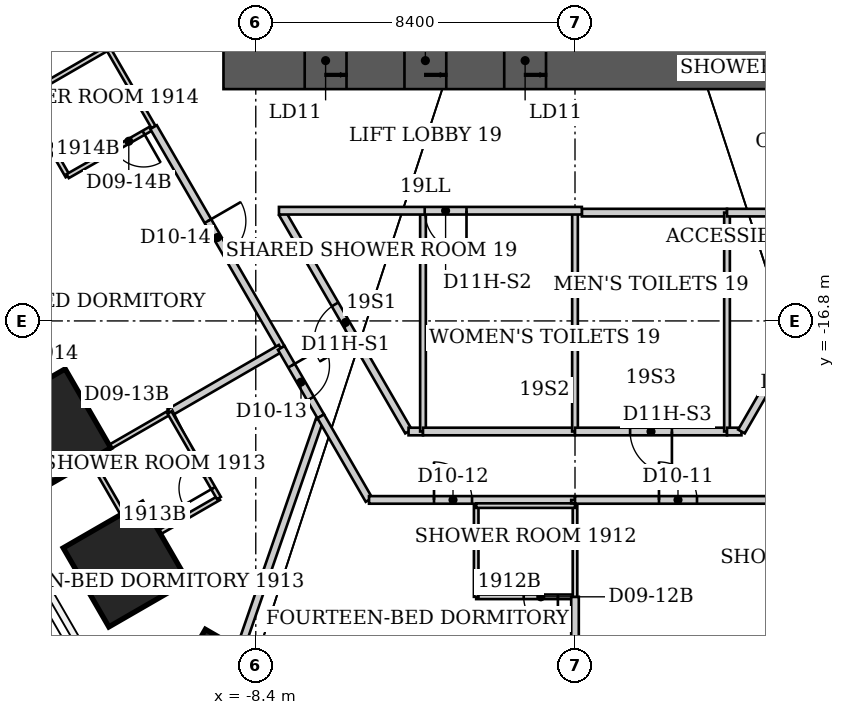
"""IFC4 building model, lengths in metres.
Left out: names, types, materials, properties, quantities, classifications, styles, units other than length and angle.
Written with IfcOpenShell. Run it as: python <this file> out.ifc"""

import sys

from ifc_helpers import new_model, si_unit, direction, frame, frame_2d, origin, origin_2d, place, context, subcontext, project, spatial, rectangle, extrude, element, fill, save


model = new_model("IFC4")
c1 = context("Model", 3, precision=1e-05, world=origin(), true_north=direction((0.0, 1.0)))
c2 = subcontext(c1, "Body", "Model", "MODEL_VIEW")
j1 = project(units=[si_unit("LENGTHUNIT", "METRE"), si_unit("PLANEANGLEUNIT", "RADIAN")], contexts=[c1])
p1 = place(None, origin())
s1 = spatial("IfcSite", under=j1, at=p1, CompositionType="ELEMENT")
p2 = place(p1, origin())
s2 = spatial("IfcBuilding", under=s1, at=p2, CompositionType="ELEMENT")
p3 = place(p2, frame((0.0, 0.0, 80.0)))
s3 = spatial("IfcBuildingStorey", under=s2, at=p3, CompositionType="ELEMENT", Elevation=80.0)
p4 = place(p3, frame((-8.766, -26.856, 0.0), z_axis=(0.014823987579, 0.04549873244, 0.998854401171), x_axis=(-0.499371140737, -0.865122253304, 0.046818272477)))
e1 = element("IfcColumn", 1, at=p4, inside=s3, PredefinedType="COLUMN", context=c2, shape_type="SweptSolid", body=[
    extrude(rectangle(XDim=2.4, YDim=3.6, at=origin_2d()), origin(), (0.0, 0.0, 1.0), 3.804),
])
p5 = place(p3, frame((-11.827, -23.212, 0.0), z_axis=(0.019833251954, 0.038960465812, 0.999043905052), x_axis=(-0.865703965576, -0.49921248457, 0.036654320816)))
e2 = element("IfcColumn", 2, at=p5, inside=s3, PredefinedType="COLUMN", context=c2, shape_type="SweptSolid", body=[
    extrude(rectangle(XDim=2.4, YDim=2.4, at=origin_2d()), origin(), (0.0, 0.0, 1.0), 3.804),
])
p6 = place(p3, frame((-13.854, -19.702, 0.0), z_axis=(0.02330242081, 0.033124102308, 0.999179558954), x_axis=(-0.865853874056, -0.498946587993, 0.036733787066)))
e3 = element("IfcColumn", 3, at=p6, inside=s3, PredefinedType="COLUMN", context=c2, shape_type="SweptSolid", body=[
    extrude(rectangle(XDim=2.4, YDim=2.4, at=origin_2d()), origin(), (0.0, 0.0, 1.0), 3.803),
])
p7 = place(p3, frame((-9.25, -9.95, 0.0), z_axis=(0.0, 0.0, 1.0), x_axis=(1.0, 0.0, 0.0)))
e4 = element("IfcWall", 4, at=p7, inside=s3, PredefinedType="SHEAR", context=c2, shape_type="SweptSolid", body=[
    extrude(rectangle(XDim=18.5, YDim=1.5, at=frame_2d((9.25, 0.0))), origin(), (0.0, 0.0, 1.0), 3.8),
])
p8 = place(p7, frame((2.137, 0.0, 0.0)))
e5 = element("IfcOpeningElement", 5, at=p8, cuts=e4, PredefinedType="OPENING", context=c2, shape_type="SweptSolid", body=[
    extrude(rectangle(XDim=1.1, YDim=2.1, at=frame_2d((0.55, 1.05))), frame((0.0, 0.75, 0.0), z_axis=(0.0, -1.0, 0.0), x_axis=(1.0, 0.0, 0.0)), (0.0, 0.0, 1.0), 1.5),
])
p9 = place(p7, frame((4.762, 0.0, 0.0)))
e6 = element("IfcOpeningElement", 6, at=p9, cuts=e4, PredefinedType="OPENING", context=c2, shape_type="SweptSolid", body=[
    extrude(rectangle(XDim=1.1, YDim=2.1, at=frame_2d((0.55, 1.05))), frame((0.0, 0.75, 0.0), z_axis=(0.0, -1.0, 0.0), x_axis=(1.0, 0.0, 0.0)), (0.0, 0.0, 1.0), 1.5),
])
p10 = place(p7, frame((7.387, 0.0, 0.0)))
e7 = element("IfcOpeningElement", 7, at=p10, cuts=e4, PredefinedType="OPENING", context=c2, shape_type="SweptSolid", body=[
    extrude(rectangle(XDim=1.1, YDim=2.1, at=frame_2d((0.55, 1.05))), frame((0.0, 0.75, 0.0), z_axis=(0.0, -1.0, 0.0), x_axis=(1.0, 0.0, 0.0)), (0.0, 0.0, 1.0), 1.5),
])
p11 = place(p3, frame((-15.064, -21.745, 0.0), z_axis=(0.0, 0.0, 1.0), x_axis=(0.866149070221, 0.499785742249, 0.0)))
e8 = element("IfcWall", 8, at=p11, inside=s3, PredefinedType="PARTITIONING", context=c2, shape_type="SweptSolid", body=[
    extrude(rectangle(XDim=2.672, YDim=0.2, at=frame_2d((1.336, 0.0))), origin(), (0.0, 0.0, 1.0), 3.64),
])
p12 = place(p3, frame((-14.54, -10.92, 0.0), z_axis=(0.0, 0.0, 1.0), x_axis=(0.49836161924, -0.866969259241, 0.0)))
e9 = element("IfcWall", 9, at=p12, inside=s3, PredefinedType="PARTITIONING", context=c2, shape_type="SweptSolid", body=[
    extrude(rectangle(XDim=2.388, YDim=0.12, at=frame_2d((1.194, 0.0))), origin(), (0.0, 0.0, 1.0), 3.64),
])
p13 = place(p3, frame((-14.54, -10.92, 0.0), z_axis=(0.0, 0.0, 1.0), x_axis=(0.865897630733, 0.500221244143, 0.0)))
e10 = element("IfcWall", 10, at=p13, inside=s3, PredefinedType="PARTITIONING", context=c2, shape_type="SweptSolid", body=[
    extrude(rectangle(XDim=2.598, YDim=0.12, at=frame_2d((1.299, 0.0))), origin(), (0.0, 0.0, 1.0), 3.64),
])
p14 = place(p3, frame((-13.35, -12.99, 0.0), z_axis=(0.0, 0.0, 1.0), x_axis=(0.868473984885, 0.49573474518, 0.0)))
e11 = element("IfcWall", 11, at=p14, inside=s3, PredefinedType="PARTITIONING", context=c2, shape_type="SweptSolid", body=[
    extrude(rectangle(XDim=2.602, YDim=0.12, at=frame_2d((1.301, 0.0))), origin(), (0.0, 0.0, 1.0), 3.64),
])
p15 = place(p14, frame((1.402, 0.0, 0.0)))
e12 = element("IfcOpeningElement", 12, at=p15, cuts=e11, PredefinedType="OPENING", context=c2, shape_type="SweptSolid", body=[
    extrude(rectangle(XDim=0.9, YDim=2.03, at=frame_2d((0.45, 1.015))), frame((0.0, 0.06, 0.0), z_axis=(0.0, -1.0, 0.0), x_axis=(1.0, 0.0, 0.0)), (0.0, 0.0, 1.0), 0.12),
])
p16 = place(p3, frame((-12.75, -20.41, 0.0), z_axis=(0.0, 0.0, 1.0), x_axis=(0.50025099007, -0.865880446098, 0.0)))
e13 = element("IfcWall", 13, at=p16, inside=s3, PredefinedType="PARTITIONING", context=c2, shape_type="SweptSolid", body=[
    extrude(rectangle(XDim=2.599, YDim=0.12, at=frame_2d((1.299, 0.0))), origin(), (0.0, 0.0, 1.0), 1.64),
])
p17 = place(p3, frame((-12.75, -20.41, 0.0), z_axis=(0.0, 0.0, 1.0), x_axis=(0.866202511239, 0.499693115345, 0.0)))
e14 = element("IfcWall", 14, at=p17, inside=s3, PredefinedType="PARTITIONING", context=c2, shape_type="SweptSolid", body=[
    extrude(rectangle(XDim=2.401, YDim=0.12, at=frame_2d((1.201, 0.0))), origin(), (0.0, 0.0, 1.0), 3.64),
])
for number, where, z_axis, x_axis in (
    (15, (-12.29, -9.62, 0.0), (0.0, 0.0, 1.0), (0.5, -0.866, 0.0)),
    (16, (-11.45, -22.66, 0.0), (0.0, 0.0, 1.0), (0.866, 0.5, 0.0)),
):
    element("IfcWall", number, at=place(p3, frame(where, z_axis=z_axis, x_axis=x_axis)), inside=s3, PredefinedType="PARTITIONING", context=c2, shape_type="SweptSolid", body=[
        extrude(rectangle(XDim=2.401, YDim=0.12, at=frame_2d((1.201, 0.0))), origin(), (0.0, 0.0, 1.0), 3.64),
    ])
p18 = place(p3, frame((-11.09, -11.7, 0.0), z_axis=(0.0, 0.0, 1.0), x_axis=(0.500633295611, -0.865659461524, 0.0)))
e17 = element("IfcWall", 17, at=p18, inside=s3, PredefinedType="PARTITIONING", context=c2, shape_type="SweptSolid", body=[
    extrude(rectangle(XDim=6.712, YDim=0.2, at=frame_2d((3.356, 0.0))), origin(), (0.0, 0.0, 1.0), 3.64),
])
p19 = place(p18, frame((2.856, 0.0, 0.0)))
e18 = element("IfcOpeningElement", 18, at=p19, cuts=e17, PredefinedType="OPENING", context=c2, shape_type="SweptSolid", body=[
    extrude(rectangle(XDim=1.0, YDim=2.13, at=frame_2d((0.5, 1.065))), frame((0.0, 0.1, 0.0), z_axis=(0.0, -1.0, 0.0), x_axis=(1.0, 0.0, 0.0)), (0.0, 0.0, 1.0), 0.2),
])
p20 = place(p3, frame((-10.67, -19.21, 0.0), z_axis=(0.0, 0.0, 1.0), x_axis=(0.865707941605, 0.500549457937, 0.0)))
e19 = element("IfcWall", 19, at=p20, inside=s3, PredefinedType="PARTITIONING", context=c2, shape_type="SweptSolid", body=[
    extrude(rectangle(XDim=3.381, YDim=0.2, at=frame_2d((1.69, 0.0))), origin(), (0.0, 0.0, 1.0), 3.64),
])
p21 = place(p3, frame((-10.2, -29.442, 0.0), z_axis=(0.0, 0.0, 1.0), x_axis=(0.327375786306, 0.944894223996, 0.0)))
e20 = element("IfcWall", 20, at=p21, inside=s3, PredefinedType="PARTITIONING", context=c2, shape_type="SweptSolid", body=[
    extrude(rectangle(XDim=10.623, YDim=0.2, at=frame_2d((5.311, 0.0))), origin(), (0.0, 0.0, 1.0), 3.64),
])
p22 = place(p3, frame((-9.37, -21.46, 0.0), z_axis=(0.0, 0.0, 1.0), x_axis=(-0.500221244143, 0.865897630733, 0.0)))
e21 = element("IfcWall", 21, at=p22, inside=s3, PredefinedType="PARTITIONING", context=c2, shape_type="SweptSolid", body=[
    extrude(rectangle(XDim=2.598, YDim=0.12, at=frame_2d((1.299, 0.0))), origin(), (0.0, 0.0, 1.0), 3.64),
])
p23 = place(p22, frame((0.3, 0.0, 0.0)))
e22 = element("IfcOpeningElement", 22, at=p23, cuts=e21, PredefinedType="OPENING", context=c2, shape_type="SweptSolid", body=[
    extrude(rectangle(XDim=0.9, YDim=2.03, at=frame_2d((0.45, 1.015))), frame((0.0, 0.06, 0.0), z_axis=(0.0, -1.0, 0.0), x_axis=(1.0, 0.0, 0.0)), (0.0, 0.0, 1.0), 0.12),
])
p24 = place(p3, frame((-7.73, -17.51, 0.0), z_axis=(0.0, 0.0, 1.0), x_axis=(0.500281510986, -0.865862812324, 0.0)))
e23 = element("IfcWall", 23, at=p24, inside=s3, PredefinedType="PARTITIONING", context=c2, shape_type="SweptSolid", body=[
    extrude(rectangle(XDim=2.079, YDim=0.2, at=frame_2d((1.04, 0.0))), origin(), (0.0, 0.0, 1.0), 3.64),
])
p25 = place(p24, frame((0.539, 0.0, 0.0)))
e24 = element("IfcOpeningElement", 24, at=p25, cuts=e23, PredefinedType="OPENING", context=c2, shape_type="SweptSolid", body=[
    extrude(rectangle(XDim=1.0, YDim=2.13, at=frame_2d((0.5, 1.065))), frame((0.0, 0.1, 0.0), z_axis=(0.0, -1.0, 0.0), x_axis=(1.0, 0.0, 0.0)), (0.0, 0.0, 1.0), 0.2),
])
p26 = place(p3, frame((-6.69, -19.31, 0.0), z_axis=(0.0, 0.0, 1.0), x_axis=(0.499963722229, -0.866046347752, 0.0)))
e25 = element("IfcWall", 25, at=p26, inside=s3, PredefinedType="PARTITIONING", context=c2, shape_type="SweptSolid", body=[
    extrude(rectangle(XDim=2.54, YDim=0.2, at=frame_2d((1.27, 0.0))), origin(), (0.0, 0.0, 1.0), 3.64),
])
p27 = place(p3, frame((-5.42, -21.51, 0.0), z_axis=(0.0, 0.0, 1.0), x_axis=(1.0, 0.0, 0.0)))
e26 = element("IfcWall", 26, at=p27, inside=s3, PredefinedType="PARTITIONING", context=c2, shape_type="SweptSolid", body=[
    extrude(rectangle(XDim=5.42, YDim=0.2, at=frame_2d((2.71, 0.0))), origin(), (0.0, 0.0, 1.0), 3.64),
])
p28 = place(p27, frame((1.71, 0.0, 0.0)))
e27 = element("IfcOpeningElement", 27, at=p28, cuts=e26, PredefinedType="OPENING", context=c2, shape_type="SweptSolid", body=[
    extrude(rectangle(XDim=1.0, YDim=2.13, at=frame_2d((0.5, 1.065))), frame((0.0, 0.1, 0.0), z_axis=(0.0, -1.0, 0.0), x_axis=(1.0, 0.0, 0.0)), (0.0, 0.0, 1.0), 0.2),
])
p29 = place(p3, frame((-4.38, -19.71, 0.0), z_axis=(0.0, 0.0, 1.0), x_axis=(-0.500523653757, 0.865722860984, 0.0)))
e28 = element("IfcWall", 28, at=p29, inside=s3, PredefinedType="PARTITIONING", context=c2, shape_type="SweptSolid", body=[
    extrude(rectangle(XDim=6.628, YDim=0.2, at=frame_2d((3.314, 0.0))), origin(), (0.0, 0.0, 1.0), 3.64),
])
p30 = place(p29, frame((2.764, 0.0, 0.0)))
e29 = element("IfcOpeningElement", 29, at=p30, cuts=e28, PredefinedType="OPENING", context=c2, shape_type="SweptSolid", body=[
    extrude(rectangle(XDim=1.1, YDim=2.2, at=frame_2d((0.55, 1.1))), frame((0.0, 0.1, 0.0), z_axis=(0.0, -1.0, 0.0), x_axis=(1.0, 0.0, 0.0)), (0.0, 0.0, 1.0), 0.2),
])
p31 = place(p3, frame((-4.0, -19.71, 0.0), z_axis=(0.0, 0.0, 1.0), x_axis=(-1.0, 0.0, 0.0)))
e30 = element("IfcWall", 30, at=p31, inside=s3, PredefinedType="PARTITIONING", context=c2, shape_type="SweptSolid", body=[
    extrude(rectangle(XDim=0.38, YDim=0.2, at=frame_2d((0.19, 0.0))), origin(), (0.0, 0.0, 1.0), 3.64),
])
p32 = place(p3, frame((-4.0, -14.0, 0.0), z_axis=(0.0, 0.0, 1.0), x_axis=(0.0, -1.0, 0.0)))
e31 = element("IfcWall", 31, at=p32, inside=s3, PredefinedType="PARTITIONING", context=c2, shape_type="SweptSolid", body=[
    extrude(rectangle(XDim=5.71, YDim=0.15, at=frame_2d((2.855, 0.0))), origin(), (0.0, 0.0, 1.0), 2.878),
])
p33 = place(p3, frame((-2.6, -24.06, 0.0), z_axis=(0.0, 0.0, 1.0), x_axis=(1.0, 0.0, 0.0)))
e32 = element("IfcWall", 32, at=p33, inside=s3, PredefinedType="PARTITIONING", context=c2, shape_type="SweptSolid", body=[
    extrude(rectangle(XDim=2.6, YDim=0.12, at=frame_2d((1.3, 0.0))), origin(), (0.0, 0.0, 1.0), 3.64),
])
p34 = place(p33, frame((1.25, 0.0, 0.0)))
e33 = element("IfcOpeningElement", 33, at=p34, cuts=e32, PredefinedType="OPENING", context=c2, shape_type="SweptSolid", body=[
    extrude(rectangle(XDim=0.9, YDim=2.03, at=frame_2d((0.45, 1.015))), frame((0.0, 0.06, 0.0), z_axis=(0.0, -1.0, 0.0), x_axis=(1.0, 0.0, 0.0)), (0.0, 0.0, 1.0), 0.12),
])
p35 = place(p3, frame((-2.6, -21.66, 0.0), z_axis=(0.0, 0.0, 1.0), x_axis=(0.0, -1.0, 0.0)))
e34 = element("IfcWall", 34, at=p35, inside=s3, PredefinedType="PARTITIONING", context=c2, shape_type="SweptSolid", body=[
    extrude(rectangle(XDim=2.4, YDim=0.12, at=frame_2d((1.2, 0.0))), origin(), (0.0, 0.0, 1.0), 3.64),
])
p36 = place(p3, frame((0.0, -29.89, 0.0), z_axis=(0.0, 0.0, 1.0), x_axis=(0.0, 1.0, 0.0)))
e35 = element("IfcWall", 35, at=p36, inside=s3, PredefinedType="PARTITIONING", context=c2, shape_type="SweptSolid", body=[
    extrude(rectangle(XDim=5.83, YDim=0.2, at=frame_2d((2.915, 0.0))), origin(), (0.0, 0.0, 1.0), 2.86),
])
p37 = place(p3, frame((0.0, -24.06, 0.0), z_axis=(0.0, 0.0, 1.0), x_axis=(0.0, 1.0, 0.0)))
e36 = element("IfcWall", 36, at=p37, inside=s3, PredefinedType="PARTITIONING", context=c2, shape_type="SweptSolid", body=[
    extrude(rectangle(XDim=2.4, YDim=0.12, at=frame_2d((1.2, 0.0))), origin(), (0.0, 0.0, 1.0), 2.86),
])
p38 = place(p3, frame((0.0, -21.66, 0.0), z_axis=(0.0, 0.0, 1.0), x_axis=(-1.0, 0.0, 0.0)))
e37 = element("IfcWall", 37, at=p38, inside=s3, PredefinedType="PARTITIONING", context=c2, shape_type="SweptSolid", body=[
    extrude(rectangle(XDim=2.6, YDim=0.12, at=frame_2d((1.3, 0.0))), origin(), (0.0, 0.0, 1.0), 3.64),
])
p39 = place(p3, frame((0.0, -21.6, 0.0), z_axis=(0.0, 0.0, 1.0), x_axis=(0.0, 1.0, 0.0)))
e38 = element("IfcWall", 38, at=p39, inside=s3, PredefinedType="PARTITIONING", context=c2, shape_type="SweptSolid", body=[
    extrude(rectangle(XDim=0.09, YDim=0.2, at=frame_2d((0.045, 0.0))), origin(), (0.0, 0.0, 1.0), 3.64),
])
p40 = place(p3, frame((0.0, -21.51, 0.0), z_axis=(0.0, 0.0, 1.0), x_axis=(1.0, 0.0, 0.0)))
e39 = element("IfcWall", 39, at=p40, inside=s3, PredefinedType="PARTITIONING", context=c2, shape_type="SweptSolid", body=[
    extrude(rectangle(XDim=5.42, YDim=0.2, at=frame_2d((2.71, 0.0))), origin(), (0.0, 0.0, 1.0), 3.64),
])
p41 = place(p40, frame((2.21, 0.0, 0.0)))
e40 = element("IfcOpeningElement", 40, at=p41, cuts=e39, PredefinedType="OPENING", context=c2, shape_type="SweptSolid", body=[
    extrude(rectangle(XDim=1.0, YDim=2.13, at=frame_2d((0.5, 1.065))), frame((0.0, 0.1, 0.0), z_axis=(0.0, -1.0, 0.0), x_axis=(1.0, 0.0, 0.0)), (0.0, 0.0, 1.0), 0.2),
])
p42 = place(p3, frame((0.0, -19.71, 0.0), z_axis=(0.0, 0.0, 1.0), x_axis=(-1.0, 0.0, 0.0)))
e41 = element("IfcWall", 41, at=p42, inside=s3, PredefinedType="PARTITIONING", context=c2, shape_type="SweptSolid", body=[
    extrude(rectangle(XDim=4.0, YDim=0.2, at=frame_2d((2.0, 0.0))), origin(), (0.0, 0.0, 1.0), 3.64),
])
p43 = place(p3, frame((0.0, -13.95, 0.0), z_axis=(0.0, 0.0, 1.0), x_axis=(0.0, -1.0, 0.0)))
e42 = element("IfcWall", 42, at=p43, inside=s3, PredefinedType="PARTITIONING", context=c2, shape_type="SweptSolid", body=[
    extrude(rectangle(XDim=5.76, YDim=0.15, at=frame_2d((2.88, 0.0))), origin(), (0.0, 0.0, 1.0), 2.86),
])
p44 = place(p3, frame((0.18, -13.95, 0.0), z_axis=(0.0, 0.0, 1.0), x_axis=(1.0, 0.0, 0.0)))
e43 = element("IfcWall", 43, at=p44, inside=s3, PredefinedType="PARTITIONING", context=c2, shape_type="SweptSolid", body=[
    extrude(rectangle(XDim=3.82, YDim=0.2, at=frame_2d((1.91, 0.0))), origin(), (0.0, 0.0, 1.0), 3.64),
])
p45 = place(p3, frame((0.18, -13.9, 0.0), z_axis=(0.0, 0.0, 1.0), x_axis=(-1.0, 0.0, 0.0)))
e44 = element("IfcWall", 44, at=p45, inside=s3, PredefinedType="PARTITIONING", context=c2, shape_type="SweptSolid", body=[
    extrude(rectangle(XDim=7.97, YDim=0.2, at=frame_2d((3.985, 0.0))), origin(), (0.0, 0.0, 1.0), 3.64),
])
p46 = place(p45, frame((3.035, 0.0, 0.0)))
e45 = element("IfcOpeningElement", 45, at=p46, cuts=e44, PredefinedType="OPENING", context=c2, shape_type="SweptSolid", body=[
    extrude(rectangle(XDim=1.1, YDim=2.2, at=frame_2d((0.55, 1.1))), frame((0.0, 0.1, 0.0), z_axis=(0.0, -1.0, 0.0), x_axis=(1.0, 0.0, 0.0)), (0.0, 0.0, 1.0), 0.2),
])
p47 = place(p3, frame((4.0, -19.71, 0.0), z_axis=(0.0, 0.0, 1.0), x_axis=(-1.0, 0.0, 0.0)))
e46 = element("IfcWall", 46, at=p47, inside=s3, PredefinedType="PARTITIONING", context=c2, shape_type="SweptSolid", body=[
    extrude(rectangle(XDim=4.0, YDim=0.2, at=frame_2d((2.0, 0.0))), origin(), (0.0, 0.0, 1.0), 3.64),
])
p48 = place(p47, frame((1.45, 0.0, 0.0)))
e47 = element("IfcOpeningElement", 47, at=p48, cuts=e46, PredefinedType="OPENING", context=c2, shape_type="SweptSolid", body=[
    extrude(rectangle(XDim=1.1, YDim=2.2, at=frame_2d((0.55, 1.1))), frame((0.0, 0.1, 0.0), z_axis=(0.0, -1.0, 0.0), x_axis=(1.0, 0.0, 0.0)), (0.0, 0.0, 1.0), 0.2),
])
p49 = place(p3, frame((4.0, -13.95, 0.0), z_axis=(0.0, 0.0, 1.0), x_axis=(0.0, -1.0, 0.0)))
e48 = element("IfcWall", 48, at=p49, inside=s3, PredefinedType="PARTITIONING", context=c2, shape_type="SweptSolid", body=[
    extrude(rectangle(XDim=5.76, YDim=0.15, at=frame_2d((2.88, 0.0))), origin(), (0.0, 0.0, 1.0), 2.878),
])
p50 = place(p3, frame((4.0, -13.95, 0.0), z_axis=(0.0, 0.0, 1.0), x_axis=(1.0, 0.0, 0.0)))
e49 = element("IfcWall", 49, at=p50, inside=s3, PredefinedType="PARTITIONING", context=c2, shape_type="SweptSolid", body=[
    extrude(rectangle(XDim=3.635, YDim=0.2, at=frame_2d((1.817, 0.0))), origin(), (0.0, 0.0, 1.0), 3.64),
])
p51 = place(p3, frame((4.38, -19.71, 0.0), z_axis=(0.0, 0.0, 1.0), x_axis=(-1.0, 0.0, 0.0)))
e50 = element("IfcWall", 50, at=p51, inside=s3, PredefinedType="PARTITIONING", context=c2, shape_type="SweptSolid", body=[
    extrude(rectangle(XDim=0.38, YDim=0.2, at=frame_2d((0.19, 0.0))), origin(), (0.0, 0.0, 1.0), 3.64),
])
p52 = place(p3, frame((7.71, -13.95, 0.0), z_axis=(0.0, 0.0, 1.0), x_axis=(-0.500511113963, -0.865730110831, 0.0)))
e51 = element("IfcWall", 51, at=p52, inside=s3, PredefinedType="PARTITIONING", context=c2, shape_type="SweptSolid", body=[
    extrude(rectangle(XDim=6.653, YDim=0.2, at=frame_2d((3.327, 0.0))), origin(), (0.0, 0.0, 1.0), 3.64),
])
p53 = place(p52, frame((2.777, 0.0, 0.0)))
e52 = element("IfcOpeningElement", 52, at=p53, cuts=e51, PredefinedType="OPENING", context=c2, shape_type="SweptSolid", body=[
    extrude(rectangle(XDim=1.1, YDim=2.2, at=frame_2d((0.55, 1.1))), frame((0.0, 0.1, 0.0), z_axis=(0.0, -1.0, 0.0), x_axis=(1.0, 0.0, 0.0)), (0.0, 0.0, 1.0), 0.2),
])
p54 = place(p41, origin())
e53 = element("IfcDoor", 53, at=p54, inside=s3, OperationType="SINGLE_SWING_LEFT", PredefinedType="DOOR", context=c2, shape_type="SweptSolid", body=[
    extrude(rectangle(XDim=1.0, YDim=2.13, at=frame_2d((0.5, 1.065))), frame((0.0, 0.025, 0.0), z_axis=(0.0, -1.0, 0.0), x_axis=(1.0, 0.0, 0.0)), (0.0, 0.0, 1.0), 0.05),
])
fill(e40, e53)
p55 = place(p28, origin())
e54 = element("IfcDoor", 54, at=p55, inside=s3, OperationType="SINGLE_SWING_LEFT", PredefinedType="DOOR", context=c2, shape_type="SweptSolid", body=[
    extrude(rectangle(XDim=1.0, YDim=2.13, at=frame_2d((0.5, 1.065))), frame((0.0, 0.025, 0.0), z_axis=(0.0, -1.0, 0.0), x_axis=(1.0, 0.0, 0.0)), (0.0, 0.0, 1.0), 0.05),
])
fill(e27, e54)
p56 = place(p34, origin())
e55 = element("IfcDoor", 55, at=p56, inside=s3, OperationType="SINGLE_SWING_RIGHT", PredefinedType="DOOR", context=c2, shape_type="SweptSolid", body=[
    extrude(rectangle(XDim=0.9, YDim=2.03, at=frame_2d((0.45, 1.015))), frame((0.0, 0.025, 0.0), z_axis=(0.0, -1.0, 0.0), x_axis=(1.0, 0.0, 0.0)), (0.0, 0.0, 1.0), 0.05),
])
fill(e33, e55)
p57 = place(p25, origin())
e56 = element("IfcDoor", 56, at=p57, inside=s3, OperationType="SINGLE_SWING_LEFT", PredefinedType="DOOR", context=c2, shape_type="SweptSolid", body=[
    extrude(rectangle(XDim=1.0, YDim=2.13, at=frame_2d((0.5, 1.065))), frame((0.0, 0.025, 0.0), z_axis=(0.0, -1.0, 0.0), x_axis=(1.0, 0.0, 0.0)), (0.0, 0.0, 1.0), 0.05),
])
fill(e24, e56)
p58 = place(p23, origin())
e57 = element("IfcDoor", 57, at=p58, inside=s3, OperationType="SINGLE_SWING_LEFT", PredefinedType="DOOR", context=c2, shape_type="SweptSolid", body=[
    extrude(rectangle(XDim=0.9, YDim=2.03, at=frame_2d((0.45, 1.015))), frame((0.0, 0.025, 0.0), z_axis=(0.0, -1.0, 0.0), x_axis=(1.0, 0.0, 0.0)), (0.0, 0.0, 1.0), 0.05),
])
fill(e22, e57)
p59 = place(p19, origin())
e58 = element("IfcDoor", 58, at=p59, inside=s3, OperationType="SINGLE_SWING_LEFT", PredefinedType="DOOR", context=c2, shape_type="SweptSolid", body=[
    extrude(rectangle(XDim=1.0, YDim=2.13, at=frame_2d((0.5, 1.065))), frame((0.0, 0.025, 0.0), z_axis=(0.0, -1.0, 0.0), x_axis=(1.0, 0.0, 0.0)), (0.0, 0.0, 1.0), 0.05),
])
fill(e18, e58)
p60 = place(p15, origin())
e59 = element("IfcDoor", 59, at=p60, inside=s3, OperationType="SINGLE_SWING_RIGHT", PredefinedType="DOOR", context=c2, shape_type="SweptSolid", body=[
    extrude(rectangle(XDim=0.9, YDim=2.03, at=frame_2d((0.45, 1.015))), frame((0.0, 0.025, 0.0), z_axis=(0.0, -1.0, 0.0), x_axis=(1.0, 0.0, 0.0)), (0.0, 0.0, 1.0), 0.05),
])
fill(e12, e59)
p61 = place(p30, origin())
e60 = element("IfcDoor", 60, at=p61, inside=s3, OperationType="SINGLE_SWING_LEFT", PredefinedType="DOOR", context=c2, shape_type="SweptSolid", body=[
    extrude(rectangle(XDim=1.1, YDim=2.2, at=frame_2d((0.55, 1.1))), frame((0.0, 0.025, 0.0), z_axis=(0.0, -1.0, 0.0), x_axis=(1.0, 0.0, 0.0)), (0.0, 0.0, 1.0), 0.05),
])
fill(e29, e60)
p62 = place(p46, origin())
e61 = element("IfcDoor", 61, at=p62, inside=s3, OperationType="SINGLE_SWING_LEFT", PredefinedType="DOOR", context=c2, shape_type="SweptSolid", body=[
    extrude(rectangle(XDim=1.1, YDim=2.2, at=frame_2d((0.55, 1.1))), frame((0.0, 0.025, 0.0), z_axis=(0.0, -1.0, 0.0), x_axis=(1.0, 0.0, 0.0)), (0.0, 0.0, 1.0), 0.05),
])
fill(e45, e61)
p63 = place(p48, origin())
e62 = element("IfcDoor", 62, at=p63, inside=s3, OperationType="SINGLE_SWING_LEFT", PredefinedType="DOOR", context=c2, shape_type="SweptSolid", body=[
    extrude(rectangle(XDim=1.1, YDim=2.2, at=frame_2d((0.55, 1.1))), frame((0.0, 0.025, 0.0), z_axis=(0.0, -1.0, 0.0), x_axis=(1.0, 0.0, 0.0)), (0.0, 0.0, 1.0), 0.05),
])
fill(e47, e62)
p64 = place(p8, origin())
e63 = element("IfcDoor", 63, at=p64, inside=s3, OperationType="DOUBLE_DOOR_SLIDING", PredefinedType="DOOR", context=c2, shape_type="SweptSolid", body=[
    extrude(rectangle(XDim=1.1, YDim=2.1, at=frame_2d((0.55, 1.05))), frame((0.0, 0.025, 0.0), z_axis=(0.0, -1.0, 0.0), x_axis=(1.0, 0.0, 0.0)), (0.0, 0.0, 1.0), 0.05),
])
fill(e5, e63)
p65 = place(p9, origin())
e64 = element("IfcDoor", 64, at=p65, inside=s3, OperationType="DOUBLE_DOOR_SLIDING", PredefinedType="DOOR", context=c2, shape_type="SweptSolid", body=[
    extrude(rectangle(XDim=1.1, YDim=2.1, at=frame_2d((0.55, 1.05))), frame((0.0, 0.025, 0.0), z_axis=(0.0, -1.0, 0.0), x_axis=(1.0, 0.0, 0.0)), (0.0, 0.0, 1.0), 0.05),
])
fill(e6, e64)
p66 = place(p10, origin())
e65 = element("IfcDoor", 65, at=p66, inside=s3, OperationType="DOUBLE_DOOR_SLIDING", PredefinedType="DOOR", context=c2, shape_type="SweptSolid", body=[
    extrude(rectangle(XDim=1.1, YDim=2.1, at=frame_2d((0.55, 1.05))), frame((0.0, 0.025, 0.0), z_axis=(0.0, -1.0, 0.0), x_axis=(1.0, 0.0, 0.0)), (0.0, 0.0, 1.0), 0.05),
])
fill(e7, e65)
save(model, sys.argv[1])
